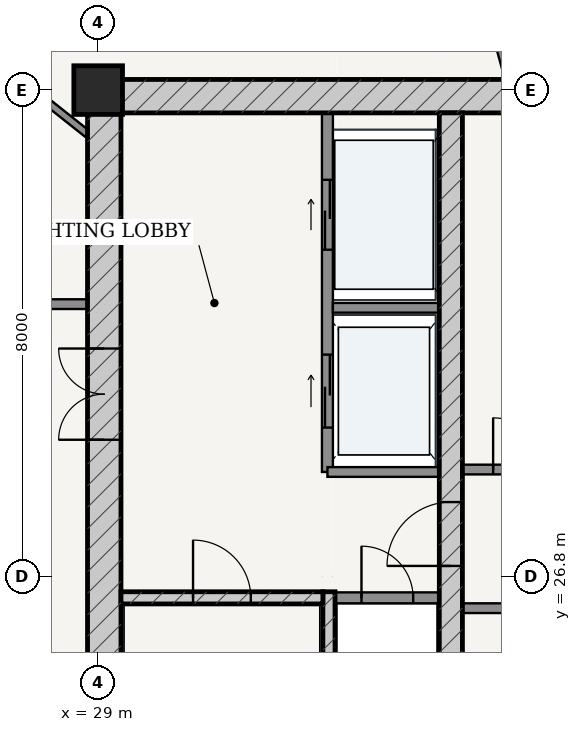
"""IFC4 building model, lengths in metres.
Left out: names, types, materials, properties, quantities, classifications, styles, units other than length and angle.
Written with IfcOpenShell. Run it as: python <this file> out.ifc"""

import sys

from ifc_helpers import new_model, si_unit, direction, frame, frame_2d, origin, origin_2d, place, context, subcontext, project, spatial, rectangle, extrude, source, transform, mapped, element, fill, save


model = new_model("IFC4")
c1 = context("Model", 3, precision=1e-05, world=origin(), true_north=direction((-0.2419218956, 0.970295726276)))
c2 = subcontext(c1, "Body", "Model", "MODEL_VIEW")
j1 = project(units=[si_unit("LENGTHUNIT", "METRE"), si_unit("PLANEANGLEUNIT", "RADIAN")], contexts=[c1])
p1 = place(None, origin())
s1 = spatial("IfcSite", under=j1, at=p1, CompositionType="ELEMENT")
p2 = place(p1, origin())
s2 = spatial("IfcBuilding", under=s1, at=p2, CompositionType="ELEMENT")
p3 = place(p2, frame((0.0, 0.0, 281.95)))
s3 = spatial("IfcBuildingStorey", under=s2, at=p3, CompositionType="ELEMENT", Elevation=281.95)
p4 = place(p3, frame((29.0, 34.8, 0.0), z_axis=(0.0, 0.0, 1.0), x_axis=(1.0, 0.0, 0.0)))
e1 = element("IfcColumn", 1, at=p4, inside=s3, PredefinedType="COLUMN", context=c2, shape_type="SweptSolid", body=[
    extrude(rectangle(XDim=0.8, YDim=0.8, at=origin_2d()), origin(), (0.0, 0.0, 1.0), 3.75),
])
p5 = place(p3, frame((28.825, 34.7, 0.0), z_axis=(0.0, 0.0, 1.0), x_axis=(1.0, 0.0, 0.0)))
e2 = element("IfcWall", 2, at=p5, inside=s3, PredefinedType="SHEAR", context=c2, shape_type="SweptSolid", body=[
    extrude(rectangle(XDim=18.35, YDim=0.55, at=frame_2d((9.175, 0.0))), origin(), (0.0, 0.0, 1.0), 3.49),
])
p6 = place(p3, frame((29.1, 19.175, 0.0), z_axis=(0.0, 0.0, 1.0), x_axis=(0.0, 1.0, 0.0)))
e3 = element("IfcWall", 3, at=p6, inside=s3, PredefinedType="SHEAR", context=c2, shape_type="SweptSolid", body=[
    extrude(rectangle(XDim=15.25, YDim=0.55, at=frame_2d((7.625, 0.0))), origin(), (0.0, 0.0, 1.0), 3.49),
])
p7 = place(p6, frame((9.875, 0.0, 0.0)))
e4 = element("IfcOpeningElement", 4, at=p7, cuts=e3, PredefinedType="OPENING", context=c2, shape_type="SweptSolid", body=[
    extrude(rectangle(XDim=1.5, YDim=2.2, at=frame_2d((0.75, 1.1))), frame((0.0, 0.285, 0.0), z_axis=(0.0, -1.0, 0.0), x_axis=(1.0, 0.0, 0.0)), (0.0, 0.0, 1.0), 0.57),
])
p8 = place(p3, frame((32.795, 19.175, 0.0), z_axis=(0.0, 0.0, 1.0), x_axis=(0.0, 1.0, 0.0)))
e5 = element("IfcWall", 5, at=p8, inside=s3, PredefinedType="SOLIDWALL", context=c2, shape_type="SweptSolid", body=[
    extrude(rectangle(XDim=7.375, YDim=0.2, at=frame_2d((3.688, 0.0))), origin(), (0.0, 0.0, 1.0), 3.49),
])
p9 = place(p3, frame((29.375, 26.45, 0.0), z_axis=(0.0, 0.0, 1.0), x_axis=(1.0, 0.0, 0.0)))
e6 = element("IfcWall", 6, at=p9, inside=s3, PredefinedType="SOLIDWALL", context=c2, shape_type="SweptSolid", body=[
    extrude(rectangle(XDim=3.32, YDim=0.2, at=frame_2d((1.66, 0.0))), origin(), (0.0, 0.0, 1.0), 3.49),
])
p10 = place(p9, frame((1.185, 0.0, 0.0)))
e7 = element("IfcOpeningElement", 7, at=p10, cuts=e6, PredefinedType="OPENING", context=c2, shape_type="SweptSolid", body=[
    extrude(rectangle(XDim=0.95, YDim=2.15, at=frame_2d((0.475, 1.075))), frame((0.0, 0.11, 0.0), z_axis=(0.0, -1.0, 0.0), x_axis=(1.0, 0.0, 0.0)), (0.0, 0.0, 1.0), 0.22),
])
p11 = place(p3, frame((34.8, 19.175, 0.0), z_axis=(0.0, 0.0, 1.0), x_axis=(0.0, 1.0, 0.0)))
e8 = element("IfcWall", 8, at=p11, inside=s3, PredefinedType="SHEAR", context=c2, shape_type="SweptSolid", body=[
    extrude(rectangle(XDim=15.25, YDim=0.38, at=frame_2d((7.625, 0.0))), origin(), (0.0, 0.0, 1.0), 3.49),
])
p12 = place(p11, frame((7.8, 0.0, 0.0)))
e9 = element("IfcOpeningElement", 9, at=p12, cuts=e8, PredefinedType="OPENING", context=c2, shape_type="SweptSolid", body=[
    extrude(rectangle(XDim=1.05, YDim=2.15, at=frame_2d((0.525, 1.075))), frame((0.0, 0.2, 0.0), z_axis=(0.0, -1.0, 0.0), x_axis=(1.0, 0.0, 0.0)), (0.0, 0.0, 1.0), 0.4),
])
p13 = place(p3, frame((32.9, 26.45, 0.0), z_axis=(0.0, 0.0, 1.0), x_axis=(1.0, 0.0, 0.0)))
e10 = element("IfcWall", 10, at=p13, inside=s3, PredefinedType="PARTITIONING", context=c2, shape_type="SweptSolid", body=[
    extrude(rectangle(XDim=1.71, YDim=0.18, at=frame_2d((0.855, 0.0))), origin(), (0.0, 0.0, 1.0), 3.49),
])
p14 = place(p13, frame((0.43, 0.0, 0.0)))
e11 = element("IfcOpeningElement", 11, at=p14, cuts=e10, PredefinedType="OPENING", context=c2, shape_type="SweptSolid", body=[
    extrude(rectangle(XDim=0.85, YDim=2.1, at=frame_2d((0.425, 1.05))), frame((0.0, 0.1, 0.0), z_axis=(0.0, -1.0, 0.0), x_axis=(1.0, 0.0, 0.0)), (0.0, 0.0, 1.0), 0.2),
])
p15 = place(p3, frame((32.77, 28.52, 0.0), z_axis=(0.0, 0.0, 1.0), x_axis=(0.0, 1.0, 0.0)))
e12 = element("IfcWall", 12, at=p15, inside=s3, PredefinedType="PARTITIONING", context=c2, shape_type="SweptSolid", body=[
    extrude(rectangle(XDim=5.905, YDim=0.18, at=frame_2d((2.953, 0.0))), origin(), (0.0, 0.0, 1.0), 3.49),
])
p16 = place(p15, frame((3.655, 0.0, 0.0)))
e13 = element("IfcOpeningElement", 13, at=p16, cuts=e12, PredefinedType="OPENING", context=c2, shape_type="SweptSolid", body=[
    extrude(rectangle(XDim=1.15, YDim=2.2, at=frame_2d((0.575, 1.1))), frame((0.0, 0.1, 0.0), z_axis=(0.0, -1.0, 0.0), x_axis=(1.0, 0.0, 0.0)), (0.0, 0.0, 1.0), 0.2),
])
p17 = place(p15, frame((0.73, 0.0, 0.0)))
e14 = element("IfcOpeningElement", 14, at=p17, cuts=e12, PredefinedType="OPENING", context=c2, shape_type="SweptSolid", body=[
    extrude(rectangle(XDim=1.2, YDim=2.25, at=frame_2d((0.6, 1.125))), frame((0.0, 0.1, 0.0), z_axis=(0.0, -1.0, 0.0), x_axis=(1.0, 0.0, 0.0)), (0.0, 0.0, 1.0), 0.2),
])
p18 = place(p3, frame((32.86, 31.22, 0.0), z_axis=(0.0, 0.0, 1.0), x_axis=(1.0, 0.0, 0.0)))
e15 = element("IfcWall", 15, at=p18, inside=s3, PredefinedType="PARTITIONING", context=c2, shape_type="SweptSolid", body=[
    extrude(rectangle(XDim=1.75, YDim=0.16, at=frame_2d((0.875, 0.0))), origin(), (0.0, 0.0, 1.0), 3.49),
])
p19 = place(p3, frame((32.77, 28.52, 0.0), z_axis=(0.0, 0.0, 1.0), x_axis=(1.0, 0.0, 0.0)))
e16 = element("IfcWall", 16, at=p19, inside=s3, PredefinedType="PARTITIONING", context=c2, shape_type="SweptSolid", body=[
    extrude(rectangle(XDim=1.84, YDim=0.16, at=frame_2d((0.92, 0.0))), origin(), (0.0, 0.0, 1.0), 3.49),
])
p20 = place(p3, frame((34.99, 28.56, 0.0), z_axis=(0.0, 0.0, 1.0), x_axis=(1.0, 0.0, 0.0)))
e17 = element("IfcWall", 17, at=p20, inside=s3, PredefinedType="PARTITIONING", context=c2, shape_type="SweptSolid", body=[
    extrude(rectangle(XDim=6.02, YDim=0.16, at=frame_2d((3.01, 0.0))), origin(), (0.0, 0.0, 1.0), 3.49),
])
p21 = place(p20, frame((0.505, 0.0, 0.0)))
e18 = element("IfcOpeningElement", 18, at=p21, cuts=e17, PredefinedType="OPENING", context=c2, shape_type="SweptSolid", body=[
    extrude(rectangle(XDim=0.85, YDim=2.1, at=frame_2d((0.425, 1.05))), frame((0.0, 0.09, 0.0), z_axis=(0.0, -1.0, 0.0), x_axis=(1.0, 0.0, 0.0)), (0.0, 0.0, 1.0), 0.18),
])
p22 = place(p20, frame((2.58, 0.0, 0.0)))
e19 = element("IfcOpeningElement", 19, at=p22, cuts=e17, PredefinedType="OPENING", context=c2, shape_type="SweptSolid", body=[
    extrude(rectangle(XDim=0.86, YDim=2.1, at=frame_2d((0.43, 1.05))), frame((0.0, 0.09, 0.0), z_axis=(0.0, -1.0, 0.0), x_axis=(1.0, 0.0, 0.0)), (0.0, 0.0, 1.0), 0.18),
])
p23 = place(p20, frame((4.665, 0.0, 0.0)))
e20 = element("IfcOpeningElement", 20, at=p23, cuts=e17, PredefinedType="OPENING", context=c2, shape_type="SweptSolid", body=[
    extrude(rectangle(XDim=0.85, YDim=2.1, at=frame_2d((0.425, 1.05))), frame((0.0, 0.09, 0.0), z_axis=(0.0, -1.0, 0.0), x_axis=(1.0, 0.0, 0.0)), (0.0, 0.0, 1.0), 0.18),
])
p24 = place(p3, frame((34.99, 26.28, 0.0), z_axis=(0.0, 0.0, 1.0), x_axis=(1.0, 0.0, 0.0)))
e21 = element("IfcWall", 21, at=p24, inside=s3, PredefinedType="PARTITIONING", context=c2, shape_type="SweptSolid", body=[
    extrude(rectangle(XDim=6.02, YDim=0.16, at=frame_2d((3.01, 0.0))), origin(), (0.0, 0.0, 1.0), 3.49),
])
p25 = place(p24, frame((1.045, 0.0, 0.0)))
e22 = element("IfcOpeningElement", 22, at=p25, cuts=e21, PredefinedType="OPENING", context=c2, shape_type="SweptSolid", body=[
    extrude(rectangle(XDim=0.85, YDim=2.1, at=frame_2d((0.425, 1.05))), frame((0.0, 0.09, 0.0), z_axis=(0.0, -1.0, 0.0), x_axis=(1.0, 0.0, 0.0)), (0.0, 0.0, 1.0), 0.18),
])
p26 = place(p24, frame((3.215, 0.0, 0.0)))
e23 = element("IfcOpeningElement", 23, at=p26, cuts=e21, PredefinedType="OPENING", context=c2, shape_type="SweptSolid", body=[
    extrude(rectangle(XDim=1.1, YDim=2.2, at=frame_2d((0.55, 1.1))), frame((0.0, 0.09, 0.0), z_axis=(0.0, -1.0, 0.0), x_axis=(1.0, 0.0, 0.0)), (0.0, 0.0, 1.0), 0.18),
])
p27 = place(p24, frame((4.695, 0.0, 0.0)))
e24 = element("IfcOpeningElement", 24, at=p27, cuts=e21, PredefinedType="OPENING", context=c2, shape_type="SweptSolid", body=[
    extrude(rectangle(XDim=1.1, YDim=2.2, at=frame_2d((0.55, 1.1))), frame((0.0, 0.09, 0.0), z_axis=(0.0, -1.0, 0.0), x_axis=(1.0, 0.0, 0.0)), (0.0, 0.0, 1.0), 0.18),
])
p28 = place(p3, frame((26.895, 31.28, 0.0), z_axis=(0.0, 0.0, 1.0), x_axis=(1.0, 0.0, 0.0)))
e25 = element("IfcWall", 25, at=p28, inside=s3, PredefinedType="PARTITIONING", context=c2, shape_type="SweptSolid", body=[
    extrude(rectangle(XDim=1.93, YDim=0.16, at=frame_2d((0.965, 0.0))), origin(), (0.0, 0.0, 1.0), 3.49),
])
p29 = place(p3, frame((35.751, 34.977, 0.0), z_axis=(0.0, 0.0, 1.0), x_axis=(-0.26521778697, 0.964188532122, 0.0)))
e26 = element("IfcWall", 26, at=p29, inside=s3, PredefinedType="PARTITIONING", context=c2, shape_type="SweptSolid", body=[
    extrude(rectangle(XDim=2.684, YDim=0.12, at=frame_2d((1.342, 0.0))), origin(), (0.0, 0.0, 1.0), 2.575),
])
p30 = place(p3, frame((28.825, 34.077, 0.0), z_axis=(0.0, 0.0, 1.0), x_axis=(-0.783444596274, 0.621461635637, 0.0)))
e27 = element("IfcWall", 27, at=p30, inside=s3, PredefinedType="PARTITIONING", context=c2, shape_type="SweptSolid", body=[
    extrude(rectangle(XDim=3.32, YDim=0.12, at=frame_2d((1.66, 0.0))), origin(), (0.0, 0.0, 1.0), 3.209),
])
m1 = source(origin(), c2, "Body", "SweptSolid", [
    extrude(rectangle(XDim=1.5, YDim=2.2, at=frame_2d((0.75, 1.1))), frame((0.0, 0.025, 0.0), z_axis=(0.0, -1.0, 0.0), x_axis=(1.0, 0.0, 0.0)), (0.0, 0.0, 1.0), 0.05),
])
p31 = place(p7, origin())
e28 = element("IfcDoor", 28, at=p31, inside=s3, OperationType="DOUBLE_DOOR_SINGLE_SWING", PredefinedType="DOOR", context=c2, shape_type="MappedRepresentation", body=[
    mapped(m1, transform((0.0, 0.0, 0.0), scale=1.0)),
])
fill(e4, e28)
m2 = source(origin(), c2, "Body", "SweptSolid", [
    extrude(rectangle(XDim=1.05, YDim=2.15, at=frame_2d((0.525, 1.075))), frame((0.0, 0.025, 0.0), z_axis=(0.0, -1.0, 0.0), x_axis=(1.0, 0.0, 0.0)), (0.0, 0.0, 1.0), 0.05),
])
p32 = place(p12, origin())
e29 = element("IfcDoor", 29, at=p32, inside=s3, OperationType="SINGLE_SWING_LEFT", PredefinedType="DOOR", context=c2, shape_type="MappedRepresentation", body=[
    mapped(m2, transform((0.0, 0.0, 0.0), scale=1.0)),
])
fill(e9, e29)
m3 = source(origin(), c2, "Body", "SweptSolid", [
    extrude(rectangle(XDim=0.95, YDim=2.15, at=frame_2d((0.475, 1.075))), frame((0.0, 0.025, 0.0), z_axis=(0.0, -1.0, 0.0), x_axis=(1.0, 0.0, 0.0)), (0.0, 0.0, 1.0), 0.05),
])
p33 = place(p10, origin())
e30 = element("IfcDoor", 30, at=p33, inside=s3, OperationType="SINGLE_SWING_LEFT", PredefinedType="DOOR", context=c2, shape_type="MappedRepresentation", body=[
    mapped(m3, transform((0.0, 0.0, 0.0), scale=1.0)),
])
fill(e7, e30)
m4 = source(origin(), c2, "Body", "SweptSolid", [
    extrude(rectangle(XDim=0.85, YDim=2.1, at=frame_2d((0.425, 1.05))), frame((0.0, 0.025, 0.0), z_axis=(0.0, -1.0, 0.0), x_axis=(1.0, 0.0, 0.0)), (0.0, 0.0, 1.0), 0.05),
])
p34 = place(p14, origin())
e31 = element("IfcDoor", 31, at=p34, inside=s3, OperationType="SINGLE_SWING_LEFT", PredefinedType="DOOR", context=c2, shape_type="MappedRepresentation", body=[
    mapped(m4, transform((0.0, 0.0, 0.0), scale=1.0)),
])
fill(e11, e31)
p35 = place(p21, origin())
e32 = element("IfcDoor", 32, at=p35, inside=s3, OperationType="SINGLE_SWING_LEFT", PredefinedType="DOOR", context=c2, shape_type="MappedRepresentation", body=[
    mapped(m4, transform((0.0, 0.0, 0.0), scale=1.0)),
])
fill(e18, e32)
m5 = source(origin(), c2, "Body", "SweptSolid", [
    extrude(rectangle(XDim=1.15, YDim=2.2, at=frame_2d((0.575, 1.1))), frame((0.0, 0.025, 0.0), z_axis=(0.0, -1.0, 0.0), x_axis=(1.0, 0.0, 0.0)), (0.0, 0.0, 1.0), 0.05),
])
p36 = place(p16, origin())
e33 = element("IfcDoor", 33, at=p36, inside=s3, OperationType="DOUBLE_DOOR_SLIDING", PredefinedType="DOOR", context=c2, shape_type="MappedRepresentation", body=[
    mapped(m5, transform((0.0, 0.0, 0.0), scale=1.0)),
])
fill(e13, e33)
m6 = source(origin(), c2, "Body", "SweptSolid", [
    extrude(rectangle(XDim=1.2, YDim=2.25, at=frame_2d((0.6, 1.125))), frame((0.0, 0.025, 0.0), z_axis=(0.0, -1.0, 0.0), x_axis=(1.0, 0.0, 0.0)), (0.0, 0.0, 1.0), 0.05),
])
p37 = place(p17, origin())
e34 = element("IfcDoor", 34, at=p37, inside=s3, OperationType="DOUBLE_DOOR_SLIDING", PredefinedType="DOOR", context=c2, shape_type="MappedRepresentation", body=[
    mapped(m6, transform((0.0, 0.0, 0.0), scale=1.0)),
])
fill(e14, e34)
save(model, sys.argv[1])
